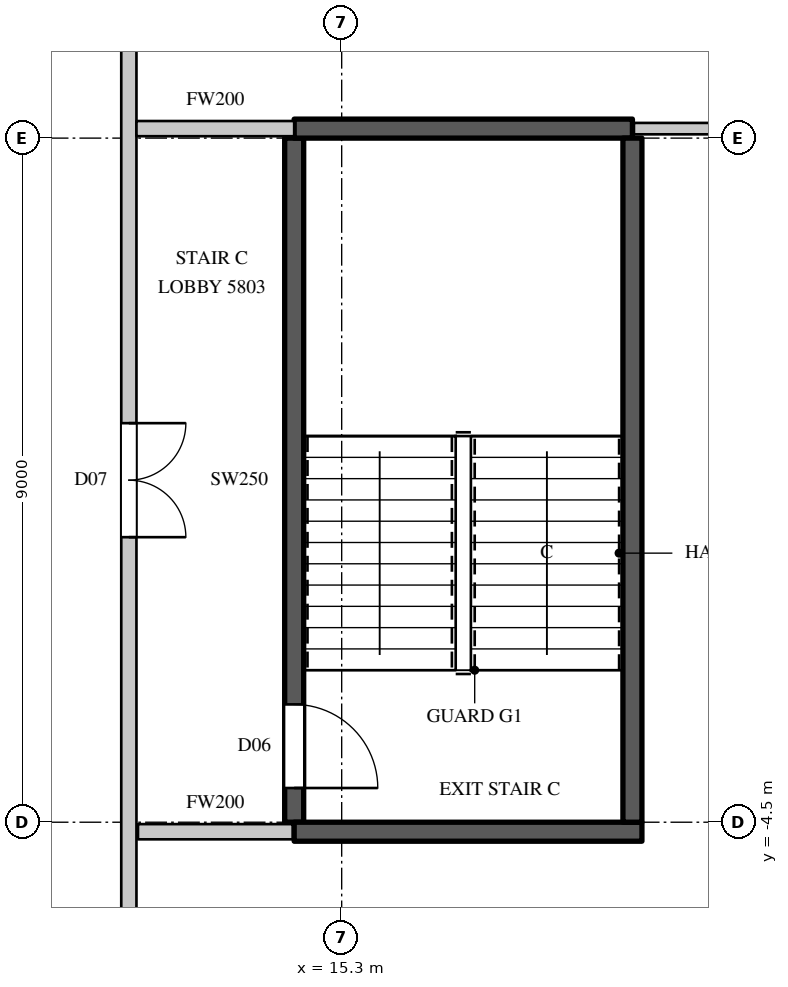
"""IFC4 building model, lengths in metres.
Left out: names, types, materials, properties, quantities, classifications, styles, units other than length and angle.
Written with IfcOpenShell. Run it as: python <this file> out.ifc"""

import sys

from ifc_helpers import new_model, si_unit, direction, frame, frame_2d, origin, place, context, subcontext, project, spatial, rectangle, extrude, element, fill, save


model = new_model("IFC4")
c1 = context("Model", 3, precision=1e-05, world=origin(), true_north=direction((0.0, 1.0)))
c2 = subcontext(c1, "Body", "Model", "MODEL_VIEW")
j1 = project(units=[si_unit("LENGTHUNIT", "METRE"), si_unit("PLANEANGLEUNIT", "RADIAN")], contexts=[c1])
p1 = place(None, origin())
s1 = spatial("IfcSite", under=j1, at=p1, CompositionType="ELEMENT")
p2 = place(p1, origin())
s2 = spatial("IfcBuilding", under=s1, at=p2, CompositionType="ELEMENT")
p3 = place(p2, frame((0.0, 0.0, 259.8)))
s3 = spatial("IfcBuildingStorey", under=s2, at=p3, CompositionType="ELEMENT", Elevation=259.8)
p4 = place(p3, frame((12.5, -13.5, 0.0), z_axis=(0.0, 0.0, 1.0), x_axis=(0.0, 1.0, 0.0)))
e1 = element("IfcWall", 1, at=p4, inside=s3, PredefinedType="PARTITIONING", context=c2, shape_type="SweptSolid", body=[
    extrude(rectangle(XDim=26.9, YDim=0.2, at=frame_2d((13.45, 0.0))), origin(), (0.0, 0.0, 1.0), 3.8),
])
p5 = place(p4, frame((12.75, 0.0, 0.0)))
e2 = element("IfcOpeningElement", 2, at=p5, cuts=e1, PredefinedType="OPENING", context=c2, shape_type="SweptSolid", body=[
    extrude(rectangle(XDim=1.5, YDim=2.4, at=frame_2d((0.75, 1.2))), frame((0.0, 0.11, 0.0), z_axis=(0.0, -1.0, 0.0), x_axis=(1.0, 0.0, 0.0)), (0.0, 0.0, 1.0), 0.22),
])
p6 = place(p3, frame((12.6, 4.625, 0.0), z_axis=(0.0, 0.0, 1.0), x_axis=(1.0, 0.0, 0.0)))
e3 = element("IfcWall", 3, at=p6, inside=s3, PredefinedType="PARTITIONING", context=c2, shape_type="SweptSolid", body=[
    extrude(rectangle(XDim=2.075, YDim=0.2, at=frame_2d((1.038, 0.0))), origin(), (0.0, 0.0, 1.0), 3.8),
])
p7 = place(p3, frame((12.62, -4.625, 0.0), z_axis=(0.0, 0.0, 1.0), x_axis=(1.0, 0.0, 0.0)))
e4 = element("IfcWall", 4, at=p7, inside=s3, PredefinedType="PARTITIONING", context=c2, shape_type="SweptSolid", body=[
    extrude(rectangle(XDim=2.035, YDim=0.2, at=frame_2d((1.018, 0.0))), origin(), (0.0, 0.0, 1.0), 3.8),
])
p8 = place(p3, frame((19.145, 4.625, 0.0), z_axis=(0.0, 0.0, 1.0), x_axis=(1.0, 0.0, 0.0)))
e5 = element("IfcWall", 5, at=p8, inside=s3, PredefinedType="PARTITIONING", context=c2, shape_type="SweptSolid", body=[
    extrude(rectangle(XDim=4.605, YDim=0.15, at=frame_2d((2.302, 0.0))), origin(), (0.0, 0.0, 1.0), 3.8),
])
p9 = place(p3, frame((14.675, -4.5, 0.0), z_axis=(0.0, 0.0, 1.0), x_axis=(0.0, 1.0, 0.0)))
e6 = element("IfcWall", 6, at=p9, inside=s3, PredefinedType="SHEAR", context=c2, shape_type="SweptSolid", body=[
    extrude(rectangle(XDim=9.0, YDim=0.25, at=frame_2d((4.5, 0.0))), origin(), (0.0, 0.0, 1.0), 3.8),
])
p10 = place(p9, frame((0.45, 0.0, 0.0)))
e7 = element("IfcOpeningElement", 7, at=p10, cuts=e6, PredefinedType="OPENING", context=c2, shape_type="SweptSolid", body=[
    extrude(rectangle(XDim=1.1, YDim=2.2, at=frame_2d((0.55, 1.1))), frame((0.0, 0.135, 0.0), z_axis=(0.0, -1.0, 0.0), x_axis=(1.0, 0.0, 0.0)), (0.0, 0.0, 1.0), 0.27),
])
p11 = place(p3, frame((14.675, -4.625, 0.0), z_axis=(0.0, 0.0, 1.0), x_axis=(1.0, 0.0, 0.0)))
e8 = element("IfcWall", 8, at=p11, inside=s3, PredefinedType="SHEAR", context=c2, shape_type="SweptSolid", body=[
    extrude(rectangle(XDim=4.575, YDim=0.25, at=frame_2d((2.288, 0.0))), origin(), (0.0, 0.0, 1.0), 3.8),
])
p12 = place(p3, frame((14.675, 4.625, 0.0), z_axis=(0.0, 0.0, 1.0), x_axis=(1.0, 0.0, 0.0)))
e9 = element("IfcWall", 9, at=p12, inside=s3, PredefinedType="SHEAR", context=c2, shape_type="SweptSolid", body=[
    extrude(rectangle(XDim=4.45, YDim=0.25, at=frame_2d((2.225, 0.0))), origin(), (0.0, 0.0, 1.0), 3.8),
])
p13 = place(p3, frame((19.125, -4.5, 0.0), z_axis=(0.0, 0.0, 1.0), x_axis=(0.0, 1.0, 0.0)))
e10 = element("IfcWall", 10, at=p13, inside=s3, PredefinedType="SHEAR", context=c2, shape_type="SweptSolid", body=[
    extrude(rectangle(XDim=9.0, YDim=0.25, at=frame_2d((4.5, 0.0))), origin(), (0.0, 0.0, 1.0), 3.8),
])
p14 = place(p5, origin())
e11 = element("IfcDoor", 11, at=p14, inside=s3, OperationType="DOUBLE_DOOR_SINGLE_SWING", PredefinedType="DOOR", context=c2, shape_type="SweptSolid", body=[
    extrude(rectangle(XDim=1.5, YDim=2.4, at=frame_2d((0.75, 1.2))), frame((0.0, 0.025, 0.0), z_axis=(0.0, -1.0, 0.0), x_axis=(1.0, 0.0, 0.0)), (0.0, 0.0, 1.0), 0.05),
])
fill(e2, e11)
p15 = place(p10, origin())
e12 = element("IfcDoor", 12, at=p15, inside=s3, OperationType="SINGLE_SWING_RIGHT", PredefinedType="DOOR", context=c2, shape_type="SweptSolid", body=[
    extrude(rectangle(XDim=1.1, YDim=2.2, at=frame_2d((0.55, 1.1))), frame((0.0, 0.025, 0.0), z_axis=(0.0, -1.0, 0.0), x_axis=(1.0, 0.0, 0.0)), (0.0, 0.0, 1.0), 0.05),
])
fill(e7, e12)
save(model, sys.argv[1])
